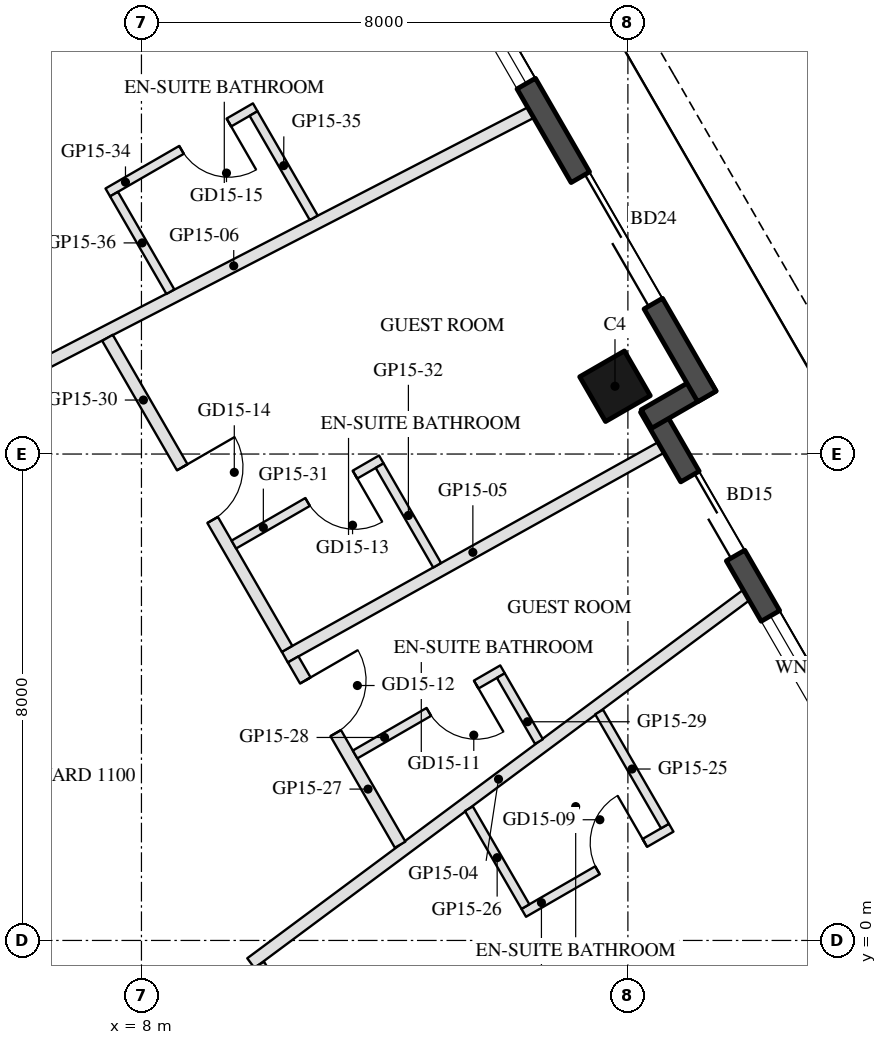
"""IFC4 building model, lengths in metres.
Left out: names, types, materials, properties, quantities, classifications, styles, units other than length and angle.
Written with IfcOpenShell. Run it as: python <this file> out.ifc"""

import sys

from ifc_helpers import new_model, si_unit, direction, frame, frame_2d, origin, origin_2d, place, context, subcontext, project, spatial, rectangle, hollow_rectangle, extrude, element, fill, save


model = new_model("IFC4")
c1 = context("Model", 3, precision=1e-05, world=origin(), true_north=direction((0.0, 1.0)))
c2 = subcontext(c1, "Body", "Model", "MODEL_VIEW")
j1 = project(units=[si_unit("LENGTHUNIT", "METRE"), si_unit("PLANEANGLEUNIT", "RADIAN")], contexts=[c1])
p1 = place(None, origin())
s1 = spatial("IfcSite", under=j1, at=p1, CompositionType="ELEMENT")
p2 = place(p1, origin())
s2 = spatial("IfcBuilding", under=s1, at=p2, CompositionType="ELEMENT")
p3 = place(p2, frame((0.0, 0.0, 168.8)))
s3 = spatial("IfcBuildingStorey", under=s2, at=p3, CompositionType="ELEMENT", Elevation=168.8)
p4 = place(p3, frame((15.788, 9.115, 0.0), z_axis=(0.0, 0.0, 1.0), x_axis=(-0.5, 0.866025403784, 0.0)))
e1 = element("IfcColumn", 1, at=p4, inside=s3, PredefinedType="COLUMN", context=c2, shape_type="SweptSolid", body=[
    extrude(hollow_rectangle(XDim=0.85, YDim=0.85, WallThickness=0.04, at=origin_2d()), origin(), (0.0, 0.0, 1.0), 3.7),
])
p5 = place(p3, frame((19.729, 2.938, 0.0), z_axis=(0.0, 0.0, 1.0), x_axis=(-0.499976430342, 0.866039011305, 0.0)))
e2 = element("IfcWall", 2, at=p5, inside=s3, PredefinedType="SOLIDWALL", context=c2, shape_type="SweptSolid", body=[
    extrude(rectangle(XDim=6.74, YDim=0.35, at=frame_2d((3.37, 0.0))), origin(), (0.0, 0.0, 1.0), 3.55),
])
p6 = place(p5, frame((0.77, 0.0, 0.3)))
e3 = element("IfcOpeningElement", 3, at=p6, cuts=e2, PredefinedType="OPENING", context=c2, shape_type="SweptSolid", body=[
    extrude(rectangle(XDim=2.0, YDim=2.65, at=frame_2d((1.0, 1.325))), frame((0.0, 0.185, 0.0), z_axis=(0.0, -1.0, 0.0), x_axis=(1.0, 0.0, 0.0)), (0.0, 0.0, 1.0), 0.37),
])
p7 = place(p5, frame((3.917, 0.0, 0.0)))
e4 = element("IfcOpeningElement", 4, at=p7, cuts=e2, PredefinedType="OPENING", context=c2, shape_type="SweptSolid", body=[
    extrude(rectangle(XDim=1.5, YDim=2.4, at=frame_2d((0.75, 1.2))), frame((0.0, 0.185, 0.0), z_axis=(0.0, -1.0, 0.0), x_axis=(1.0, 0.0, 0.0)), (0.0, 0.0, 1.0), 0.37),
])
p8 = place(p3, frame((16.306, 8.577, 0.0), z_axis=(0.0, 0.0, 1.0), x_axis=(0.866092288191, 0.499884134912, 0.0)))
e5 = element("IfcWall", 5, at=p8, inside=s3, PredefinedType="SOLIDWALL", context=c2, shape_type="SweptSolid", body=[
    extrude(rectangle(XDim=1.22, YDim=0.35, at=frame_2d((0.61, 0.0))), origin(), (0.0, 0.0, 1.0), 3.55),
])
p9 = place(p3, frame((17.299, 8.948, 0.0), z_axis=(0.0, 0.0, 1.0), x_axis=(-0.500010041276, 0.866019606374, 0.0)))
e6 = element("IfcWall", 6, at=p9, inside=s3, PredefinedType="SOLIDWALL", context=c2, shape_type="SweptSolid", body=[
    extrude(rectangle(XDim=9.7, YDim=0.35, at=frame_2d((4.85, 0.0))), origin(), (0.0, 0.0, 1.0), 3.55),
])
p10 = place(p9, frame((1.762, 0.0, 0.0)))
e7 = element("IfcOpeningElement", 7, at=p10, cuts=e6, PredefinedType="OPENING", context=c2, shape_type="SweptSolid", body=[
    extrude(rectangle(XDim=2.4, YDim=2.4, at=frame_2d((1.2, 1.2))), frame((0.0, 0.185, 0.0), z_axis=(0.0, -1.0, 0.0), x_axis=(1.0, 0.0, 0.0)), (0.0, 0.0, 1.0), 0.37),
])
p11 = place(p9, frame((5.941, 0.0, 0.3)))
e8 = element("IfcOpeningElement", 8, at=p11, cuts=e6, PredefinedType="OPENING", context=c2, shape_type="SweptSolid", body=[
    extrude(rectangle(XDim=2.0, YDim=2.65, at=frame_2d((1.0, 1.325))), frame((0.0, 0.185, 0.0), z_axis=(0.0, -1.0, 0.0), x_axis=(1.0, 0.0, 0.0)), (0.0, 0.0, 1.0), 0.37),
])
p12 = place(p3, frame((17.945, 5.679, 0.0), z_axis=(0.0, 0.0, 1.0), x_axis=(-0.802677042984, -0.596413920584, 0.0)))
e9 = element("IfcWall", 9, at=p12, inside=s3, PredefinedType="PARTITIONING", context=c2, shape_type="SweptSolid", body=[
    extrude(rectangle(XDim=10.147, YDim=0.2, at=frame_2d((5.074, 0.0))), origin(), (0.0, 0.0, 1.0), 2.95),
])
p13 = place(p3, frame((16.543, 8.106, 0.0), z_axis=(0.0, 0.0, 1.0), x_axis=(-0.873587451419, -0.486667201199, 0.0)))
e10 = element("IfcWall", 10, at=p13, inside=s3, PredefinedType="PARTITIONING", context=c2, shape_type="SweptSolid", body=[
    extrude(rectangle(XDim=7.081, YDim=0.2, at=frame_2d((3.541, 0.0))), origin(), (0.0, 0.0, 1.0), 3.06),
])
p14 = place(p3, frame((14.402, 13.615, 0.0), z_axis=(0.0, 0.0, 1.0), x_axis=(-0.888691893785, -0.458504872299, 0.0)))
e11 = element("IfcWall", 11, at=p14, inside=s3, PredefinedType="PARTITIONING", context=c2, shape_type="SweptSolid", body=[
    extrude(rectangle(XDim=10.992, YDim=0.2, at=frame_2d((5.496, 0.0))), origin(), (0.0, 0.0, 1.0), 3.06),
])
p15 = place(p3, frame((9.931, -0.401, 0.0), z_axis=(0.0, 0.0, 1.0), x_axis=(0.5000418389, -0.866001246737, 0.0)))
e12 = element("IfcWall", 12, at=p15, inside=s3, PredefinedType="PARTITIONING", context=c2, shape_type="SweptSolid", body=[
    extrude(rectangle(XDim=4.676, YDim=0.2, at=frame_2d((2.338, 0.0))), origin(), (0.0, 0.0, 1.0), 2.95),
])
p16 = place(p15, frame((1.838, 0.0, 0.0)))
e13 = element("IfcOpeningElement", 13, at=p16, cuts=e12, PredefinedType="OPENING", context=c2, shape_type="SweptSolid", body=[
    extrude(rectangle(XDim=1.0, YDim=2.1, at=frame_2d((0.5, 1.05))), frame((0.0, 0.11, 0.0), z_axis=(0.0, -1.0, 0.0), x_axis=(1.0, 0.0, 0.0)), (0.0, 0.0, 1.0), 0.22),
])
p17 = place(p3, frame((14.287, 0.454, 0.0), z_axis=(0.0, 0.0, 1.0), x_axis=(0.866034573852, 0.49998411664, 0.0)))
e14 = element("IfcWall", 14, at=p17, inside=s3, PredefinedType="PARTITIONING", context=c2, shape_type="SweptSolid", body=[
    extrude(rectangle(XDim=2.8, YDim=0.15, at=frame_2d((1.4, 0.0))), origin(), (0.0, 0.0, 1.0), 3.55),
])
p18 = place(p17, frame((1.4, 0.0, 0.0)))
e15 = element("IfcOpeningElement", 15, at=p18, cuts=e14, PredefinedType="OPENING", context=c2, shape_type="SweptSolid", body=[
    extrude(rectangle(XDim=0.9, YDim=2.1, at=frame_2d((0.45, 1.05))), frame((0.0, 0.085, 0.0), z_axis=(0.0, -1.0, 0.0), x_axis=(1.0, 0.0, 0.0)), (0.0, 0.0, 1.0), 0.17),
])
p19 = place(p3, frame((16.61, 1.882, 0.0), z_axis=(0.0, 0.0, 1.0), x_axis=(-0.500018419339, 0.866014769113, 0.0)))
e16 = element("IfcWall", 16, at=p19, inside=s3, PredefinedType="PARTITIONING", context=c2, shape_type="SweptSolid", body=[
    extrude(rectangle(XDim=2.166, YDim=0.15, at=frame_2d((1.083, 0.0))), origin(), (0.0, 0.0, 1.0), 3.55),
])
p20 = place(p3, frame((14.314, 0.557, 0.0), z_axis=(0.0, 0.0, 1.0), x_axis=(-0.500052179009, 0.865995276124, 0.0)))
e17 = element("IfcWall", 17, at=p20, inside=s3, PredefinedType="PARTITIONING", context=c2, shape_type="SweptSolid", body=[
    extrude(rectangle(XDim=1.859, YDim=0.15, at=frame_2d((0.929, 0.0))), origin(), (0.0, 0.0, 1.0), 3.55),
])
p21 = place(p3, frame((10.495, 4.622, 0.0), z_axis=(0.0, 0.0, 1.0), x_axis=(0.500004750779, -0.866022660904, 0.0)))
e18 = element("IfcWall", 18, at=p21, inside=s3, PredefinedType="PARTITIONING", context=c2, shape_type="SweptSolid", body=[
    extrude(rectangle(XDim=3.519, YDim=0.2, at=frame_2d((1.759, 0.0))), origin(), (0.0, 0.0, 1.0), 2.95),
])
p22 = place(p21, frame((0.4, 0.0, 0.0)))
e19 = element("IfcOpeningElement", 19, at=p22, cuts=e18, PredefinedType="OPENING", context=c2, shape_type="SweptSolid", body=[
    extrude(rectangle(XDim=1.0, YDim=2.1, at=frame_2d((0.5, 1.05))), frame((0.0, 0.11, 0.0), z_axis=(0.0, -1.0, 0.0), x_axis=(1.0, 0.0, 0.0)), (0.0, 0.0, 1.0), 0.22),
])
p23 = place(p3, frame((13.938, 4.458, 0.0), z_axis=(0.0, 0.0, 1.0), x_axis=(-0.866034573852, -0.49998411664, 0.0)))
e20 = element("IfcWall", 20, at=p23, inside=s3, PredefinedType="PARTITIONING", context=c2, shape_type="SweptSolid", body=[
    extrude(rectangle(XDim=2.8, YDim=0.15, at=frame_2d((1.4, 0.0))), origin(), (0.0, 0.0, 1.0), 3.55),
])
p24 = place(p23, frame((0.5, 0.0, 0.0)))
e21 = element("IfcOpeningElement", 21, at=p24, cuts=e20, PredefinedType="OPENING", context=c2, shape_type="SweptSolid", body=[
    extrude(rectangle(XDim=0.9, YDim=2.1, at=frame_2d((0.45, 1.05))), frame((0.0, 0.085, 0.0), z_axis=(0.0, -1.0, 0.0), x_axis=(1.0, 0.0, 0.0)), (0.0, 0.0, 1.0), 0.17),
])
p25 = place(p3, frame((14.537, 3.271, 0.0), z_axis=(0.0, 0.0, 1.0), x_axis=(-0.500037327496, 0.866003851672, 0.0)))
e22 = element("IfcWall", 22, at=p25, inside=s3, PredefinedType="PARTITIONING", context=c2, shape_type="SweptSolid", body=[
    extrude(rectangle(XDim=1.253, YDim=0.15, at=frame_2d((0.626, 0.0))), origin(), (0.0, 0.0, 1.0), 2.95),
])
p26 = place(p3, frame((7.441, 9.911, 0.0), z_axis=(0.0, 0.0, 1.0), x_axis=(0.500006275671, -0.866021780494, 0.0)))
e23 = element("IfcWall", 23, at=p26, inside=s3, PredefinedType="PARTITIONING", context=c2, shape_type="SweptSolid", body=[
    extrude(rectangle(XDim=5.907, YDim=0.2, at=frame_2d((2.954, 0.0))), origin(), (0.0, 0.0, 1.0), 2.95),
])
p27 = place(p26, frame((2.458, 0.0, 0.0)))
e24 = element("IfcOpeningElement", 24, at=p27, cuts=e23, PredefinedType="OPENING", context=c2, shape_type="SweptSolid", body=[
    extrude(rectangle(XDim=1.0, YDim=2.1, at=frame_2d((0.5, 1.05))), frame((0.0, 0.11, 0.0), z_axis=(0.0, -1.0, 0.0), x_axis=(1.0, 0.0, 0.0)), (0.0, 0.0, 1.0), 0.22),
])
p28 = place(p3, frame((11.945, 7.911, 0.0), z_axis=(0.0, 0.0, 1.0), x_axis=(-0.865996816683, -0.500049511043, 0.0)))
e25 = element("IfcWall", 25, at=p28, inside=s3, PredefinedType="PARTITIONING", context=c2, shape_type="SweptSolid", body=[
    extrude(rectangle(XDim=2.8, YDim=0.15, at=frame_2d((1.4, 0.0))), origin(), (0.0, 0.0, 1.0), 3.55),
])
p29 = place(p28, frame((0.5, 0.0, 0.0)))
e26 = element("IfcOpeningElement", 26, at=p29, cuts=e25, PredefinedType="OPENING", context=c2, shape_type="SweptSolid", body=[
    extrude(rectangle(XDim=0.9, YDim=2.1, at=frame_2d((0.45, 1.05))), frame((0.0, 0.085, 0.0), z_axis=(0.0, -1.0, 0.0), x_axis=(1.0, 0.0, 0.0)), (0.0, 0.0, 1.0), 0.17),
])
p30 = place(p3, frame((12.863, 6.171, 0.0), z_axis=(0.0, 0.0, 1.0), x_axis=(-0.499998034377, 0.866026538634, 0.0)))
e27 = element("IfcWall", 27, at=p30, inside=s3, PredefinedType="PARTITIONING", context=c2, shape_type="SweptSolid", body=[
    extrude(rectangle(XDim=1.892, YDim=0.15, at=frame_2d((0.946, 0.0))), origin(), (0.0, 0.0, 1.0), 2.95),
])
p31 = place(p3, frame((9.871, 13.702, 0.0), z_axis=(0.0, 0.0, 1.0), x_axis=(-0.866034573852, -0.49998411664, 0.0)))
e28 = element("IfcWall", 28, at=p31, inside=s3, PredefinedType="PARTITIONING", context=c2, shape_type="SweptSolid", body=[
    extrude(rectangle(XDim=2.8, YDim=0.15, at=frame_2d((1.4, 0.0))), origin(), (0.0, 0.0, 1.0), 3.55),
])
p32 = place(p31, frame((0.5, 0.0, 0.0)))
e29 = element("IfcOpeningElement", 29, at=p32, cuts=e28, PredefinedType="OPENING", context=c2, shape_type="SweptSolid", body=[
    extrude(rectangle(XDim=0.9, YDim=2.1, at=frame_2d((0.45, 1.05))), frame((0.0, 0.085, 0.0), z_axis=(0.0, -1.0, 0.0), x_axis=(1.0, 0.0, 0.0)), (0.0, 0.0, 1.0), 0.17),
])
p33 = place(p3, frame((10.833, 11.886, 0.0), z_axis=(0.0, 0.0, 1.0), x_axis=(-0.500000102728, 0.866025344474, 0.0)))
e30 = element("IfcWall", 30, at=p33, inside=s3, PredefinedType="PARTITIONING", context=c2, shape_type="SweptSolid", body=[
    extrude(rectangle(XDim=1.979, YDim=0.15, at=frame_2d((0.99, 0.0))), origin(), (0.0, 0.0, 1.0), 3.55),
])
p34 = place(p3, frame((8.476, 10.67, 0.0), z_axis=(0.0, 0.0, 1.0), x_axis=(-0.499992292652, 0.866029853578, 0.0)))
e31 = element("IfcWall", 31, at=p34, inside=s3, PredefinedType="PARTITIONING", context=c2, shape_type="SweptSolid", body=[
    extrude(rectangle(XDim=1.854, YDim=0.15, at=frame_2d((0.927, 0.0))), origin(), (0.0, 0.0, 1.0), 3.55),
])
p35 = place(p6, origin())
e32 = element("IfcWindow", 32, at=p35, inside=s3, PartitioningType="SINGLE_PANEL", PredefinedType="WINDOW", context=c2, shape_type="SweptSolid", body=[
    extrude(rectangle(XDim=2.0, YDim=2.65, at=frame_2d((1.0, 1.325))), frame((0.0, 0.03, 0.0), z_axis=(0.0, -1.0, 0.0), x_axis=(1.0, 0.0, 0.0)), (0.0, 0.0, 1.0), 0.06),
])
fill(e3, e32)
p36 = place(p7, frame((1.5, 0.0, 0.0), z_axis=(0.0, 0.0, 1.0), x_axis=(-1.0, 0.0, 0.0)))
e33 = element("IfcDoor", 33, at=p36, inside=s3, OperationType="SLIDING_TO_LEFT", PredefinedType="DOOR", context=c2, shape_type="SweptSolid", body=[
    extrude(rectangle(XDim=1.5, YDim=2.4, at=frame_2d((0.75, 1.2))), frame((0.0, 0.025, 0.0), z_axis=(0.0, -1.0, 0.0), x_axis=(1.0, 0.0, 0.0)), (0.0, 0.0, 1.0), 0.05),
])
fill(e4, e33)
p37 = place(p10, frame((2.4, 0.0, 0.0), z_axis=(0.0, 0.0, 1.0), x_axis=(-1.0, 0.0, 0.0)))
e34 = element("IfcDoor", 34, at=p37, inside=s3, OperationType="SLIDING_TO_LEFT", PredefinedType="DOOR", context=c2, shape_type="SweptSolid", body=[
    extrude(rectangle(XDim=2.4, YDim=2.4, at=frame_2d((1.2, 1.2))), frame((0.0, 0.025, 0.0), z_axis=(0.0, -1.0, 0.0), x_axis=(1.0, 0.0, 0.0)), (0.0, 0.0, 1.0), 0.05),
])
fill(e7, e34)
p38 = place(p11, origin())
e35 = element("IfcWindow", 35, at=p38, inside=s3, PartitioningType="SINGLE_PANEL", PredefinedType="WINDOW", context=c2, shape_type="SweptSolid", body=[
    extrude(rectangle(XDim=2.0, YDim=2.65, at=frame_2d((1.0, 1.325))), frame((0.0, 0.03, 0.0), z_axis=(0.0, -1.0, 0.0), x_axis=(1.0, 0.0, 0.0)), (0.0, 0.0, 1.0), 0.06),
])
fill(e8, e35)
p39 = place(p18, origin())
e36 = element("IfcDoor", 36, at=p39, inside=s3, OperationType="SINGLE_SWING_RIGHT", PredefinedType="DOOR", context=c2, shape_type="SweptSolid", body=[
    extrude(rectangle(XDim=0.9, YDim=2.1, at=frame_2d((0.45, 1.05))), frame((0.0, 0.025, 0.0), z_axis=(0.0, -1.0, 0.0), x_axis=(1.0, 0.0, 0.0)), (0.0, 0.0, 1.0), 0.05),
])
fill(e15, e36)
p40 = place(p24, origin())
e37 = element("IfcDoor", 37, at=p40, inside=s3, OperationType="SINGLE_SWING_LEFT", PredefinedType="DOOR", context=c2, shape_type="SweptSolid", body=[
    extrude(rectangle(XDim=0.9, YDim=2.1, at=frame_2d((0.45, 1.05))), frame((0.0, 0.025, 0.0), z_axis=(0.0, -1.0, 0.0), x_axis=(1.0, 0.0, 0.0)), (0.0, 0.0, 1.0), 0.05),
])
fill(e21, e37)
p41 = place(p22, origin())
e38 = element("IfcDoor", 38, at=p41, inside=s3, OperationType="SINGLE_SWING_LEFT", PredefinedType="DOOR", context=c2, shape_type="SweptSolid", body=[
    extrude(rectangle(XDim=1.0, YDim=2.1, at=frame_2d((0.5, 1.05))), frame((0.0, 0.025, 0.0), z_axis=(0.0, -1.0, 0.0), x_axis=(1.0, 0.0, 0.0)), (0.0, 0.0, 1.0), 0.05),
])
fill(e19, e38)
p42 = place(p29, origin())
e39 = element("IfcDoor", 39, at=p42, inside=s3, OperationType="SINGLE_SWING_LEFT", PredefinedType="DOOR", context=c2, shape_type="SweptSolid", body=[
    extrude(rectangle(XDim=0.9, YDim=2.1, at=frame_2d((0.45, 1.05))), frame((0.0, 0.025, 0.0), z_axis=(0.0, -1.0, 0.0), x_axis=(1.0, 0.0, 0.0)), (0.0, 0.0, 1.0), 0.05),
])
fill(e26, e39)
p43 = place(p27, origin())
e40 = element("IfcDoor", 40, at=p43, inside=s3, OperationType="SINGLE_SWING_LEFT", PredefinedType="DOOR", context=c2, shape_type="SweptSolid", body=[
    extrude(rectangle(XDim=1.0, YDim=2.1, at=frame_2d((0.5, 1.05))), frame((0.0, 0.025, 0.0), z_axis=(0.0, -1.0, 0.0), x_axis=(1.0, 0.0, 0.0)), (0.0, 0.0, 1.0), 0.05),
])
fill(e24, e40)
p44 = place(p32, origin())
e41 = element("IfcDoor", 41, at=p44, inside=s3, OperationType="SINGLE_SWING_LEFT", PredefinedType="DOOR", context=c2, shape_type="SweptSolid", body=[
    extrude(rectangle(XDim=0.9, YDim=2.1, at=frame_2d((0.45, 1.05))), frame((0.0, 0.025, 0.0), z_axis=(0.0, -1.0, 0.0), x_axis=(1.0, 0.0, 0.0)), (0.0, 0.0, 1.0), 0.05),
])
fill(e29, e41)
save(model, sys.argv[1])
